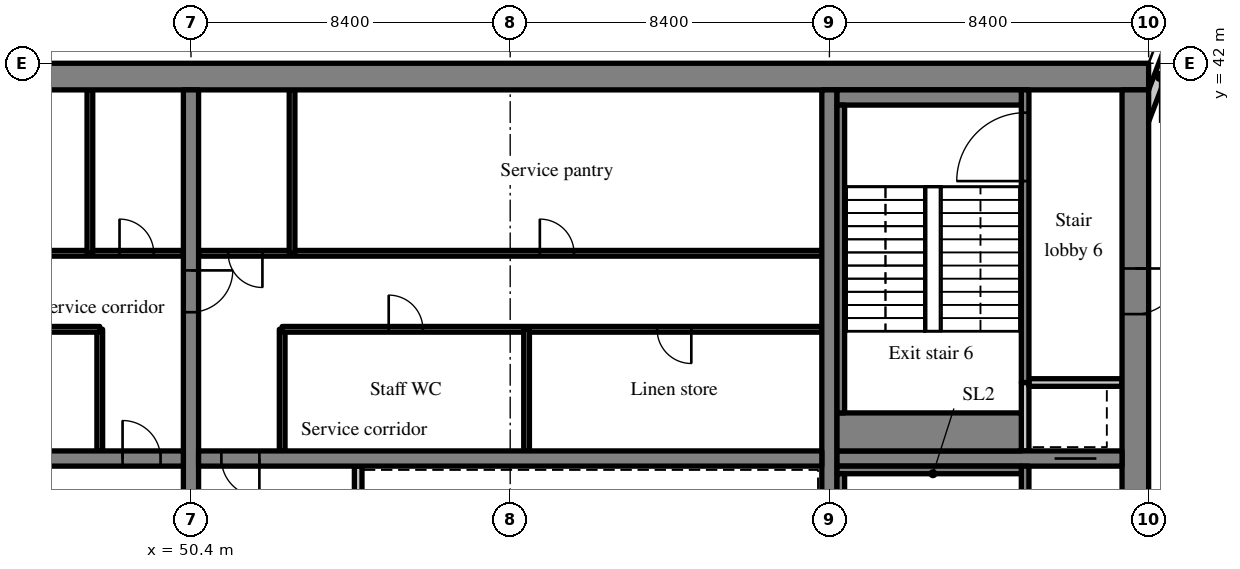
"""IFC4 building model, lengths in metres.
Left out: names, types, materials, properties, quantities, classifications, styles, units other than length and angle.
Written with IfcOpenShell. Run it as: python <this file> out.ifc"""

import sys

from ifc_helpers import new_model, si_unit, direction, frame, frame_2d, origin, place, context, subcontext, project, spatial, rectangle, extrude, source, transform, mapped, element, fill, save


model = new_model("IFC4")
c1 = context("Model", 3, precision=1e-05, world=origin(), true_north=direction((0.0, 1.0)))
c2 = subcontext(c1, "Body", "Model", "MODEL_VIEW")
j1 = project(units=[si_unit("LENGTHUNIT", "METRE"), si_unit("PLANEANGLEUNIT", "RADIAN")], contexts=[c1])
p1 = place(None, origin())
s1 = spatial("IfcSite", under=j1, at=p1, CompositionType="ELEMENT")
p2 = place(p1, origin())
s2 = spatial("IfcBuilding", under=s1, at=p2, CompositionType="ELEMENT")
p3 = place(p2, frame((0.0, 0.0, 151.6)))
s3 = spatial("IfcBuildingStorey", under=s2, at=p3, CompositionType="ELEMENT", Elevation=151.6)
m1 = source(origin(), c2, "Body", "SweptSolid", [
    extrude(rectangle(XDim=50.4, YDim=0.7, at=frame_2d((25.2, 0.0))), origin(), (0.0, 0.0, 1.0), 3.52),
])
p4 = place(p3, frame((25.2, 41.65, 0.0), z_axis=(0.0, 0.0, 1.0), x_axis=(1.0, 0.0, 0.0)))
e1 = element("IfcWall", 1, at=p4, inside=s3, PredefinedType="SHEAR", context=c2, shape_type="MappedRepresentation", body=[
    mapped(m1, transform((0.0, 0.0, 0.0), scale=1.0)),
])
m2 = source(origin(), c2, "Body", "SweptSolid", [
    extrude(rectangle(XDim=18.6, YDim=0.7, at=frame_2d((9.3, 0.0))), origin(), (0.0, 0.0, 1.0), 3.52),
])
p5 = place(p3, frame((75.25, 22.7, 0.0), z_axis=(0.0, 0.0, 1.0), x_axis=(0.0, 1.0, 0.0)))
e2 = element("IfcWall", 2, at=p5, inside=s3, PredefinedType="SHEAR", context=c2, shape_type="MappedRepresentation", body=[
    mapped(m2, transform((0.0, 0.0, 0.0), scale=1.0)),
])
m3 = source(origin(), c2, "Body", "SweptSolid", [
    extrude(rectangle(XDim=1.2, YDim=2.1, at=frame_2d((0.6, 1.05))), frame((0.0, 0.36, 0.0), z_axis=(0.0, -1.0, 0.0), x_axis=(1.0, 0.0, 0.0)), (0.0, 0.0, 1.0), 0.72),
])
p6 = place(p5, frame((12.7, 0.0, 0.0)))
e3 = element("IfcOpeningElement", 3, at=p6, cuts=e2, PredefinedType="OPENING", context=c2, shape_type="MappedRepresentation", body=[
    mapped(m3, transform((0.0, 0.0, 0.0), scale=1.0)),
])
m4 = source(origin(), c2, "Body", "SweptSolid", [
    extrude(rectangle(XDim=18.6, YDim=0.4, at=frame_2d((9.3, 0.0))), origin(), (0.0, 0.0, 1.0), 3.52),
])
p7 = place(p3, frame((50.4, 22.7, 0.0), z_axis=(0.0, 0.0, 1.0), x_axis=(0.0, 1.0, 0.0)))
e4 = element("IfcWall", 4, at=p7, inside=s3, PredefinedType="SHEAR", context=c2, shape_type="MappedRepresentation", body=[
    mapped(m4, transform((0.0, 0.0, 0.0), scale=1.0)),
])
m5 = source(origin(), c2, "Body", "SweptSolid", [
    extrude(rectangle(XDim=1.1, YDim=2.1, at=frame_2d((0.55, 1.05))), frame((0.0, 0.21, 0.0), z_axis=(0.0, -1.0, 0.0), x_axis=(1.0, 0.0, 0.0)), (0.0, 0.0, 1.0), 0.42),
])
p8 = place(p7, frame((12.75, 0.0, 0.0)))
e5 = element("IfcOpeningElement", 5, at=p8, cuts=e4, PredefinedType="OPENING", context=c2, shape_type="MappedRepresentation", body=[
    mapped(m5, transform((0.0, 0.0, 0.0), scale=1.0)),
])
p9 = place(p3, frame((67.2, 22.7, 0.0), z_axis=(0.0, 0.0, 1.0), x_axis=(0.0, 1.0, 0.0)))
e6 = element("IfcWall", 6, at=p9, inside=s3, PredefinedType="SHEAR", context=c2, shape_type="MappedRepresentation", body=[
    mapped(m4, transform((0.0, 0.0, 0.0), scale=1.0)),
])
m6 = source(origin(), c2, "Body", "SweptSolid", [
    extrude(rectangle(XDim=16.4, YDim=0.4, at=frame_2d((8.2, 0.0))), origin(), (0.0, 0.0, 1.0), 3.52),
])
p10 = place(p3, frame((33.8, 31.6, 0.0), z_axis=(0.0, 0.0, 1.0), x_axis=(1.0, 0.0, 0.0)))
e7 = element("IfcWall", 7, at=p10, inside=s3, PredefinedType="SHEAR", context=c2, shape_type="MappedRepresentation", body=[
    mapped(m6, transform((0.0, 0.0, 0.0), scale=1.0)),
])
m7 = source(origin(), c2, "Body", "SweptSolid", [
    extrude(rectangle(XDim=1.0, YDim=2.1, at=frame_2d((0.5, 1.05))), frame((0.0, 0.21, 0.0), z_axis=(0.0, -1.0, 0.0), x_axis=(1.0, 0.0, 0.0)), (0.0, 0.0, 1.0), 0.42),
])
p11 = place(p10, frame((14.8, 0.0, 0.0)))
e8 = element("IfcOpeningElement", 8, at=p11, cuts=e7, PredefinedType="OPENING", context=c2, shape_type="MappedRepresentation", body=[
    mapped(m7, transform((0.0, 0.0, 0.0), scale=1.0)),
])
p12 = place(p3, frame((50.6, 31.6, 0.0), z_axis=(0.0, 0.0, 1.0), x_axis=(1.0, 0.0, 0.0)))
e9 = element("IfcWall", 9, at=p12, inside=s3, PredefinedType="SHEAR", context=c2, shape_type="MappedRepresentation", body=[
    mapped(m6, transform((0.0, 0.0, 0.0), scale=1.0)),
])
p13 = place(p12, frame((0.6, 0.0, 0.0)))
e10 = element("IfcOpeningElement", 10, at=p13, cuts=e9, PredefinedType="OPENING", context=c2, shape_type="MappedRepresentation", body=[
    mapped(m7, transform((0.0, 0.0, 0.0), scale=1.0)),
])
m8 = source(origin(), c2, "Body", "SweptSolid", [
    extrude(rectangle(XDim=7.5, YDim=0.4, at=frame_2d((3.75, 0.0))), origin(), (0.0, 0.0, 1.0), 3.52),
])
p14 = place(p3, frame((67.4, 31.6, 0.0), z_axis=(0.0, 0.0, 1.0), x_axis=(1.0, 0.0, 0.0)))
e11 = element("IfcWall", 11, at=p14, inside=s3, PredefinedType="SHEAR", context=c2, shape_type="MappedRepresentation", body=[
    mapped(m8, transform((0.0, 0.0, 0.0), scale=1.0)),
])
p15 = place(p14, frame((5.725, 0.0, 0.0)))
e12 = element("IfcOpeningElement", 12, at=p15, cuts=e11, PredefinedType="OPENING", context=c2, shape_type="MappedRepresentation", body=[
    mapped(m5, transform((0.0, 0.0, 0.0), scale=1.0)),
])
m9 = source(origin(), c2, "Body", "SweptSolid", [
    extrude(rectangle(XDim=3.559, YDim=0.3, at=frame_2d((1.78, 0.0))), origin(), (0.0, 0.0, 1.0), 3.52),
])
p16 = place(p3, frame((76.523, 43.292, 0.0), z_axis=(0.0, 0.0, 1.0), x_axis=(-0.35779745313, -0.933799219604, 0.0)))
e13 = element("IfcWall", 13, at=p16, inside=s3, PredefinedType="SOLIDWALL", context=c2, shape_type="MappedRepresentation", body=[
    mapped(m9, transform((0.0, 0.0, 0.0), scale=1.0)),
])
m10 = source(origin(), c2, "Body", "SweptSolid", [
    extrude(rectangle(XDim=1.5, YDim=2.0, at=frame_2d((0.75, 1.0))), frame((0.0, 0.16, 0.0), z_axis=(0.0, -1.0, 0.0), x_axis=(1.0, 0.0, 0.0)), (0.0, 0.0, 1.0), 0.32),
])
p17 = place(p16, frame((0.156, 0.0, 0.9)))
e14 = element("IfcOpeningElement", 14, at=p17, cuts=e13, PredefinedType="OPENING", context=c2, shape_type="MappedRepresentation", body=[
    mapped(m10, transform((0.0, 0.0, 0.0), scale=1.0)),
])
m11 = source(origin(), c2, "Body", "SweptSolid", [
    extrude(rectangle(XDim=3.2, YDim=0.15, at=frame_2d((1.6, 0.0))), origin(), (0.0, 0.0, 1.0), 3.52),
])
p18 = place(p3, frame((48.0, 31.8, 0.0), z_axis=(0.0, 0.0, 1.0), x_axis=(0.0, 1.0, 0.0)))
e15 = element("IfcWall", 15, at=p18, inside=s3, PredefinedType="PARTITIONING", context=c2, shape_type="MappedRepresentation", body=[
    mapped(m11, transform((0.0, 0.0, 0.0), scale=1.0)),
])
m12 = source(origin(), c2, "Body", "SweptSolid", [
    extrude(rectangle(XDim=14.2, YDim=0.15, at=frame_2d((7.1, 0.0))), origin(), (0.0, 0.0, 1.0), 3.52),
])
p19 = place(p3, frame((33.8, 35.0, 0.0), z_axis=(0.0, 0.0, 1.0), x_axis=(1.0, 0.0, 0.0)))
e16 = element("IfcWall", 16, at=p19, inside=s3, PredefinedType="PARTITIONING", context=c2, shape_type="MappedRepresentation", body=[
    mapped(m12, transform((0.0, 0.0, 0.0), scale=1.0)),
])
m13 = source(origin(), c2, "Body", "SweptSolid", [
    extrude(rectangle(XDim=0.9, YDim=2.1, at=frame_2d((0.45, 1.05))), frame((0.0, 0.085, 0.0), z_axis=(0.0, -1.0, 0.0), x_axis=(1.0, 0.0, 0.0)), (0.0, 0.0, 1.0), 0.17),
])
p20 = place(p19, frame((6.612, 0.0, 0.0)))
e17 = element("IfcOpeningElement", 17, at=p20, cuts=e16, PredefinedType="OPENING", context=c2, shape_type="MappedRepresentation", body=[
    mapped(m13, transform((0.0, 0.0, 0.0), scale=1.0)),
])
m14 = source(origin(), c2, "Body", "SweptSolid", [
    extrude(rectangle(XDim=16.4, YDim=0.15, at=frame_2d((8.2, 0.0))), origin(), (0.0, 0.0, 1.0), 3.52),
])
p21 = place(p3, frame((33.8, 37.0, 0.0), z_axis=(0.0, 0.0, 1.0), x_axis=(1.0, 0.0, 0.0)))
e18 = element("IfcWall", 18, at=p21, inside=s3, PredefinedType="PARTITIONING", context=c2, shape_type="MappedRepresentation", body=[
    mapped(m14, transform((0.0, 0.0, 0.0), scale=1.0)),
])
p22 = place(p21, frame((0.78, 0.0, 0.0)))
e19 = element("IfcOpeningElement", 19, at=p22, cuts=e18, PredefinedType="OPENING", context=c2, shape_type="MappedRepresentation", body=[
    mapped(m13, transform((0.0, 0.0, 0.0), scale=1.0)),
])
p23 = place(p21, frame((3.65, 0.0, 0.0)))
e20 = element("IfcOpeningElement", 20, at=p23, cuts=e18, PredefinedType="OPENING", context=c2, shape_type="MappedRepresentation", body=[
    mapped(m13, transform((0.0, 0.0, 0.0), scale=1.0)),
])
p24 = place(p21, frame((9.39, 0.0, 0.0)))
e21 = element("IfcOpeningElement", 21, at=p24, cuts=e18, PredefinedType="OPENING", context=c2, shape_type="MappedRepresentation", body=[
    mapped(m13, transform((0.0, 0.0, 0.0), scale=1.0)),
])
p25 = place(p21, frame((14.72, 0.0, 0.0)))
e22 = element("IfcOpeningElement", 22, at=p25, cuts=e18, PredefinedType="OPENING", context=c2, shape_type="MappedRepresentation", body=[
    mapped(m13, transform((0.0, 0.0, 0.0), scale=1.0)),
])
m15 = source(origin(), c2, "Body", "SweptSolid", [
    extrude(rectangle(XDim=4.3, YDim=0.15, at=frame_2d((2.15, 0.0))), origin(), (0.0, 0.0, 1.0), 3.52),
])
p26 = place(p3, frame((47.74, 37.0, 0.0), z_axis=(0.0, 0.0, 1.0), x_axis=(0.0, 1.0, 0.0)))
e23 = element("IfcWall", 23, at=p26, inside=s3, PredefinedType="PARTITIONING", context=c2, shape_type="MappedRepresentation", body=[
    mapped(m15, transform((0.0, 0.0, 0.0), scale=1.0)),
])
m16 = source(origin(), c2, "Body", "SweptSolid", [
    extrude(rectangle(XDim=2.6, YDim=0.2, at=frame_2d((1.3, 0.0))), origin(), (0.0, 0.0, 1.0), 3.52),
])
p27 = place(p3, frame((54.8, 28.8, 0.0), z_axis=(0.0, 0.0, 1.0), x_axis=(0.0, 1.0, 0.0)))
e24 = element("IfcWall", 24, at=p27, inside=s3, PredefinedType="SOLIDWALL", context=c2, shape_type="MappedRepresentation", body=[
    mapped(m16, transform((0.0, 0.0, 0.0), scale=1.0)),
])
p28 = place(p3, frame((52.8, 31.8, 0.0), z_axis=(0.0, 0.0, 1.0), x_axis=(0.0, 1.0, 0.0)))
e25 = element("IfcWall", 25, at=p28, inside=s3, PredefinedType="PARTITIONING", context=c2, shape_type="MappedRepresentation", body=[
    mapped(m11, transform((0.0, 0.0, 0.0), scale=1.0)),
])
p29 = place(p3, frame((67.0, 35.0, 0.0), z_axis=(0.0, 0.0, 1.0), x_axis=(-1.0, 0.0, 0.0)))
e26 = element("IfcWall", 26, at=p29, inside=s3, PredefinedType="PARTITIONING", context=c2, shape_type="MappedRepresentation", body=[
    mapped(m12, transform((0.0, 0.0, 0.0), scale=1.0)),
])
p30 = place(p29, frame((3.434, 0.0, 0.0)))
e27 = element("IfcOpeningElement", 27, at=p30, cuts=e26, PredefinedType="OPENING", context=c2, shape_type="MappedRepresentation", body=[
    mapped(m13, transform((0.0, 0.0, 0.0), scale=1.0)),
])
p31 = place(p29, frame((10.497, 0.0, 0.0)))
e28 = element("IfcOpeningElement", 28, at=p31, cuts=e26, PredefinedType="OPENING", context=c2, shape_type="MappedRepresentation", body=[
    mapped(m13, transform((0.0, 0.0, 0.0), scale=1.0)),
])
p32 = place(p3, frame((67.0, 37.0, 0.0), z_axis=(0.0, 0.0, 1.0), x_axis=(-1.0, 0.0, 0.0)))
e29 = element("IfcWall", 29, at=p32, inside=s3, PredefinedType="PARTITIONING", context=c2, shape_type="MappedRepresentation", body=[
    mapped(m14, transform((0.0, 0.0, 0.0), scale=1.0)),
])
p33 = place(p32, frame((6.52, 0.0, 0.0)))
e30 = element("IfcOpeningElement", 30, at=p33, cuts=e29, PredefinedType="OPENING", context=c2, shape_type="MappedRepresentation", body=[
    mapped(m13, transform((0.0, 0.0, 0.0), scale=1.0)),
])
p34 = place(p32, frame((14.72, 0.0, 0.0)))
e31 = element("IfcOpeningElement", 31, at=p34, cuts=e29, PredefinedType="OPENING", context=c2, shape_type="MappedRepresentation", body=[
    mapped(m13, transform((0.0, 0.0, 0.0), scale=1.0)),
])
p35 = place(p3, frame((59.231, 31.8, 0.0), z_axis=(0.0, 0.0, 1.0), x_axis=(0.0, 1.0, 0.0)))
e32 = element("IfcWall", 32, at=p35, inside=s3, PredefinedType="PARTITIONING", context=c2, shape_type="MappedRepresentation", body=[
    mapped(m11, transform((0.0, 0.0, 0.0), scale=1.0)),
])
p36 = place(p3, frame((53.06, 37.0, 0.0), z_axis=(0.0, 0.0, 1.0), x_axis=(0.0, 1.0, 0.0)))
e33 = element("IfcWall", 33, at=p36, inside=s3, PredefinedType="PARTITIONING", context=c2, shape_type="MappedRepresentation", body=[
    mapped(m15, transform((0.0, 0.0, 0.0), scale=1.0)),
])
m17 = source(origin(), c2, "Body", "SweptSolid", [
    extrude(rectangle(XDim=8.7, YDim=0.2, at=frame_2d((4.35, 0.0))), origin(), (0.0, 0.0, 1.0), 3.52),
])
p37 = place(p3, frame((72.35, 22.7, 0.0), z_axis=(0.0, 0.0, 1.0), x_axis=(0.0, 1.0, 0.0)))
e34 = element("IfcWall", 34, at=p37, inside=s3, PredefinedType="SOLIDWALL", context=c2, shape_type="MappedRepresentation", body=[
    mapped(m17, transform((0.0, 0.0, 0.0), scale=1.0)),
])
m18 = source(origin(), c2, "Body", "SweptSolid", [
    extrude(rectangle(XDim=1.2, YDim=2.1, at=frame_2d((0.6, 1.05))), frame((0.0, 0.11, 0.0), z_axis=(0.0, -1.0, 0.0), x_axis=(1.0, 0.0, 0.0)), (0.0, 0.0, 1.0), 0.22),
])
p38 = place(p37, frame((6.8, 0.0, 0.0)))
e35 = element("IfcOpeningElement", 35, at=p38, cuts=e34, PredefinedType="OPENING", context=c2, shape_type="MappedRepresentation", body=[
    mapped(m18, transform((0.0, 0.0, 0.0), scale=1.0)),
])
m19 = source(origin(), c2, "Body", "SweptSolid", [
    extrude(rectangle(XDim=1.8, YDim=0.2, at=frame_2d((0.9, 0.0))), origin(), (0.0, 0.0, 1.0), 3.52),
])
p39 = place(p3, frame((72.35, 31.8, 0.0), z_axis=(0.0, 0.0, 1.0), x_axis=(0.0, 1.0, 0.0)))
e36 = element("IfcWall", 36, at=p39, inside=s3, PredefinedType="SOLIDWALL", context=c2, shape_type="MappedRepresentation", body=[
    mapped(m19, transform((0.0, 0.0, 0.0), scale=1.0)),
])
m20 = source(origin(), c2, "Body", "SweptSolid", [
    extrude(rectangle(XDim=2.45, YDim=0.2, at=frame_2d((1.225, 0.0))), origin(), (0.0, 0.0, 1.0), 3.52),
])
p40 = place(p3, frame((72.45, 33.6, 0.0), z_axis=(0.0, 0.0, 1.0), x_axis=(1.0, 0.0, 0.0)))
e37 = element("IfcWall", 37, at=p40, inside=s3, PredefinedType="SOLIDWALL", context=c2, shape_type="MappedRepresentation", body=[
    mapped(m20, transform((0.0, 0.0, 0.0), scale=1.0)),
])
m21 = source(origin(), c2, "Body", "SweptSolid", [
    extrude(rectangle(XDim=7.7, YDim=0.2, at=frame_2d((3.85, 0.0))), origin(), (0.0, 0.0, 1.0), 3.52),
])
p41 = place(p3, frame((72.35, 33.6, 0.0), z_axis=(0.0, 0.0, 1.0), x_axis=(0.0, 1.0, 0.0)))
e38 = element("IfcWall", 38, at=p41, inside=s3, PredefinedType="SOLIDWALL", context=c2, shape_type="MappedRepresentation", body=[
    mapped(m21, transform((0.0, 0.0, 0.0), scale=1.0)),
])
m22 = source(origin(), c2, "Body", "SweptSolid", [
    extrude(rectangle(XDim=1.8, YDim=2.1, at=frame_2d((0.9, 1.05))), frame((0.0, 0.11, 0.0), z_axis=(0.0, -1.0, 0.0), x_axis=(1.0, 0.0, 0.0)), (0.0, 0.0, 1.0), 0.22),
])
p42 = place(p41, frame((5.3, 0.0, 0.0)))
e39 = element("IfcOpeningElement", 39, at=p42, cuts=e38, PredefinedType="OPENING", context=c2, shape_type="MappedRepresentation", body=[
    mapped(m22, transform((0.0, 0.0, 0.0), scale=1.0)),
])
m23 = source(origin(), c2, "Body", "SweptSolid", [
    extrude(rectangle(XDim=4.85, YDim=0.2, at=frame_2d((2.425, 0.0))), origin(), (0.0, 0.0, 1.0), 3.52),
])
p43 = place(p3, frame((67.4, 31.3, 0.0), z_axis=(0.0, 0.0, 1.0), x_axis=(1.0, 0.0, 0.0)))
e40 = element("IfcWall", 40, at=p43, inside=s3, PredefinedType="SOLIDWALL", context=c2, shape_type="MappedRepresentation", body=[
    mapped(m23, transform((0.0, 0.0, 0.0), scale=1.0)),
])
m24 = source(origin(), c2, "Body", "SweptSolid", [
    extrude(rectangle(XDim=8.1, YDim=0.2, at=frame_2d((4.05, 0.0))), origin(), (0.0, 0.0, 1.0), 3.52),
])
p44 = place(p3, frame((67.5, 23.1, 0.0), z_axis=(0.0, 0.0, 1.0), x_axis=(0.0, 1.0, 0.0)))
e41 = element("IfcWall", 41, at=p44, inside=s3, PredefinedType="SOLIDWALL", context=c2, shape_type="MappedRepresentation", body=[
    mapped(m24, transform((0.0, 0.0, 0.0), scale=1.0)),
])
m25 = source(origin(), c2, "Body", "SweptSolid", [
    extrude(rectangle(XDim=4.85, YDim=0.4, at=frame_2d((2.425, 0.0))), origin(), (0.0, 0.0, 1.0), 3.52),
])
p45 = place(p3, frame((67.4, 41.1, 0.0), z_axis=(0.0, 0.0, 1.0), x_axis=(1.0, 0.0, 0.0)))
e42 = element("IfcWall", 42, at=p45, inside=s3, PredefinedType="SOLIDWALL", context=c2, shape_type="MappedRepresentation", body=[
    mapped(m25, transform((0.0, 0.0, 0.0), scale=1.0)),
])
m26 = source(origin(), c2, "Body", "SweptSolid", [
    extrude(rectangle(XDim=4.85, YDim=1.0, at=frame_2d((2.425, 0.0))), origin(), (0.0, 0.0, 1.0), 3.52),
])
p46 = place(p3, frame((67.4, 32.3, 0.0), z_axis=(0.0, 0.0, 1.0), x_axis=(1.0, 0.0, 0.0)))
e43 = element("IfcWall", 43, at=p46, inside=s3, PredefinedType="SOLIDWALL", context=c2, shape_type="MappedRepresentation", body=[
    mapped(m26, transform((0.0, 0.0, 0.0), scale=1.0)),
])
p47 = place(p3, frame((67.5, 32.8, 0.0), z_axis=(0.0, 0.0, 1.0), x_axis=(0.0, 1.0, 0.0)))
e44 = element("IfcWall", 44, at=p47, inside=s3, PredefinedType="SOLIDWALL", context=c2, shape_type="MappedRepresentation", body=[
    mapped(m24, transform((0.0, 0.0, 0.0), scale=1.0)),
])
m27 = source(origin(), c2, "Body", "SweptSolid", [
    extrude(rectangle(XDim=1.0, YDim=2.1, at=frame_2d((0.5, 1.05))), frame((0.0, 0.025, 0.0), z_axis=(0.0, -1.0, 0.0), x_axis=(1.0, 0.0, 0.0)), (0.0, 0.0, 1.0), 0.05),
])
p48 = place(p11, origin())
e45 = element("IfcDoor", 45, at=p48, inside=s3, OperationType="SINGLE_SWING_LEFT", PredefinedType="DOOR", context=c2, shape_type="MappedRepresentation", body=[
    mapped(m27, transform((0.0, 0.0, 0.0), scale=1.0)),
])
fill(e8, e45)
m28 = source(origin(), c2, "Body", "SweptSolid", [
    extrude(rectangle(XDim=0.9, YDim=2.1, at=frame_2d((0.45, 1.05))), frame((0.0, 0.025, 0.0), z_axis=(0.0, -1.0, 0.0), x_axis=(1.0, 0.0, 0.0)), (0.0, 0.0, 1.0), 0.05),
])
p49 = place(p25, origin())
e46 = element("IfcDoor", 46, at=p49, inside=s3, OperationType="SINGLE_SWING_LEFT", PredefinedType="DOOR", context=c2, shape_type="MappedRepresentation", body=[
    mapped(m28, transform((0.0, 0.0, 0.0), scale=1.0)),
])
fill(e22, e46)
p50 = place(p13, origin())
e47 = element("IfcDoor", 47, at=p50, inside=s3, OperationType="SINGLE_SWING_RIGHT", PredefinedType="DOOR", context=c2, shape_type="MappedRepresentation", body=[
    mapped(m27, transform((0.0, 0.0, 0.0), scale=1.0)),
])
fill(e10, e47)
p51 = place(p30, origin())
e48 = element("IfcDoor", 48, at=p51, inside=s3, OperationType="SINGLE_SWING_LEFT", PredefinedType="DOOR", context=c2, shape_type="MappedRepresentation", body=[
    mapped(m28, transform((0.0, 0.0, 0.0), scale=1.0)),
])
fill(e27, e48)
p52 = place(p31, origin())
e49 = element("IfcDoor", 49, at=p52, inside=s3, OperationType="SINGLE_SWING_RIGHT", PredefinedType="DOOR", context=c2, shape_type="MappedRepresentation", body=[
    mapped(m28, transform((0.0, 0.0, 0.0), scale=1.0)),
])
fill(e28, e49)
p53 = place(p33, origin())
e50 = element("IfcDoor", 50, at=p53, inside=s3, OperationType="SINGLE_SWING_RIGHT", PredefinedType="DOOR", context=c2, shape_type="MappedRepresentation", body=[
    mapped(m28, transform((0.0, 0.0, 0.0), scale=1.0)),
])
fill(e30, e50)
p54 = place(p34, origin())
e51 = element("IfcDoor", 51, at=p54, inside=s3, OperationType="SINGLE_SWING_LEFT", PredefinedType="DOOR", context=c2, shape_type="MappedRepresentation", body=[
    mapped(m28, transform((0.0, 0.0, 0.0), scale=1.0)),
])
fill(e31, e51)
m29 = source(origin(), c2, "Body", "SweptSolid", [
    extrude(rectangle(XDim=1.1, YDim=2.1, at=frame_2d((0.55, 1.05))), frame((0.0, 0.025, 0.0), z_axis=(0.0, -1.0, 0.0), x_axis=(1.0, 0.0, 0.0)), (0.0, 0.0, 1.0), 0.05),
])
p55 = place(p15, origin())
e52 = element("IfcDoor", 52, at=p55, inside=s3, OperationType="SLIDING_TO_RIGHT", PredefinedType="DOOR", context=c2, shape_type="MappedRepresentation", body=[
    mapped(m29, transform((0.0, 0.0, 0.0), scale=1.0)),
])
fill(e12, e52)
m30 = source(origin(), c2, "Body", "SweptSolid", [
    extrude(rectangle(XDim=1.8, YDim=2.1, at=frame_2d((0.9, 1.05))), frame((0.0, 0.025, 0.0), z_axis=(0.0, -1.0, 0.0), x_axis=(1.0, 0.0, 0.0)), (0.0, 0.0, 1.0), 0.05),
])
p56 = place(p42, origin())
e53 = element("IfcDoor", 53, at=p56, inside=s3, OperationType="SINGLE_SWING_LEFT", PredefinedType="DOOR", context=c2, shape_type="MappedRepresentation", body=[
    mapped(m30, transform((0.0, 0.0, 0.0), scale=1.0)),
])
fill(e39, e53)
m31 = source(origin(), c2, "Body", "SweptSolid", [
    extrude(rectangle(XDim=1.2, YDim=2.1, at=frame_2d((0.6, 1.05))), frame((0.0, 0.025, 0.0), z_axis=(0.0, -1.0, 0.0), x_axis=(1.0, 0.0, 0.0)), (0.0, 0.0, 1.0), 0.05),
])
p57 = place(p6, origin())
e54 = element("IfcDoor", 54, at=p57, inside=s3, OperationType="SINGLE_SWING_RIGHT", PredefinedType="DOOR", context=c2, shape_type="MappedRepresentation", body=[
    mapped(m31, transform((0.0, 0.0, 0.0), scale=1.0)),
])
fill(e3, e54)
p58 = place(p8, origin())
e55 = element("IfcDoor", 55, at=p58, inside=s3, OperationType="SINGLE_SWING_RIGHT", PredefinedType="DOOR", context=c2, shape_type="MappedRepresentation", body=[
    mapped(m29, transform((0.0, 0.0, 0.0), scale=1.0)),
])
fill(e5, e55)
save(model, sys.argv[1])
